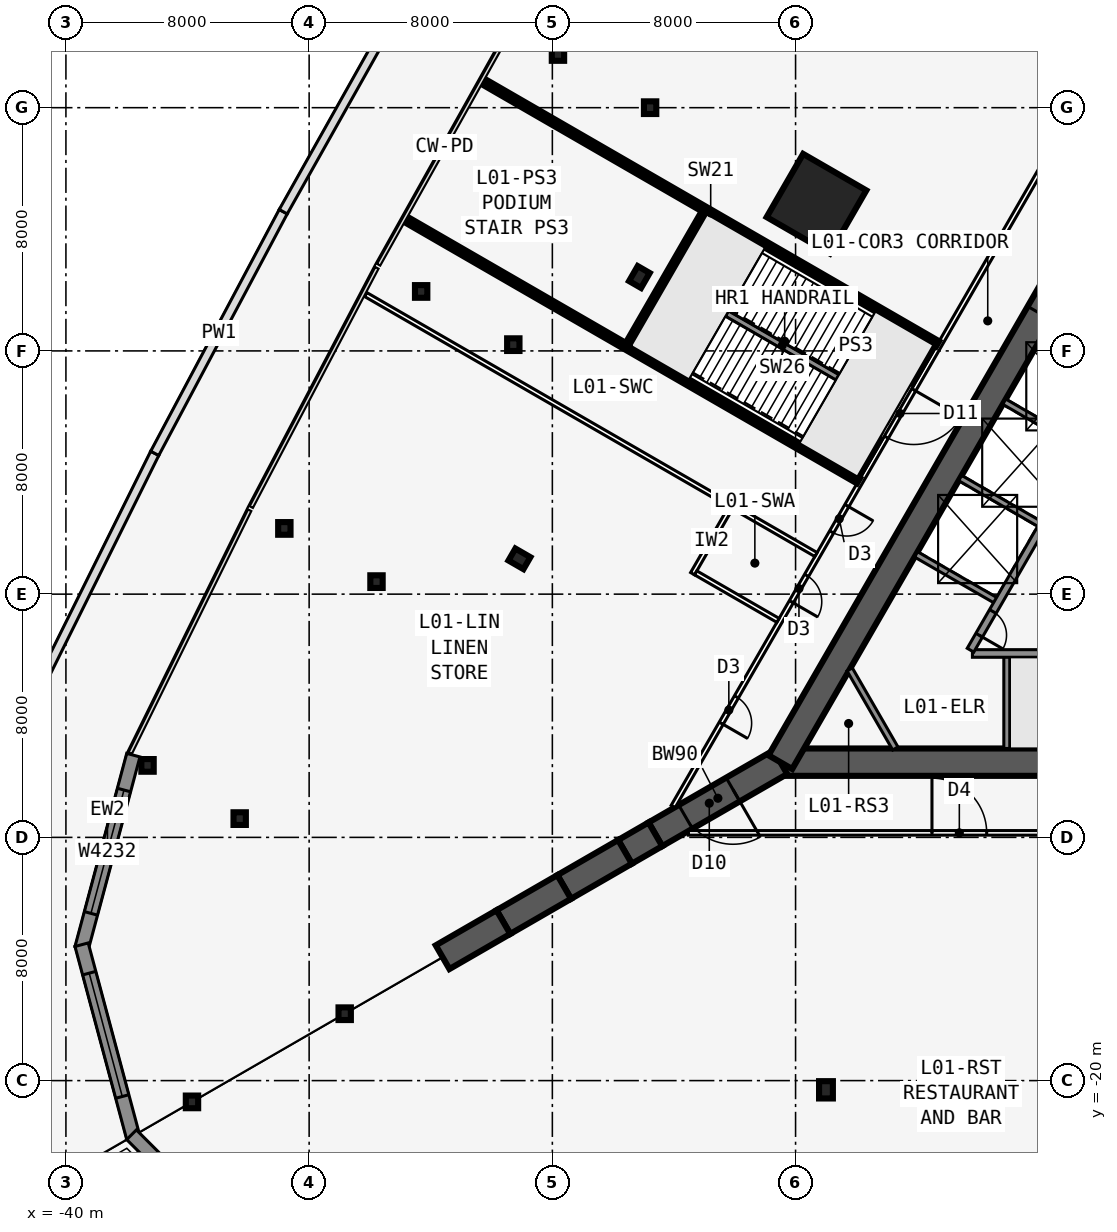
"""IFC4 building model, lengths in metres.
Left out: names, types, materials, properties, quantities, classifications, styles, units other than length and angle.
Written with IfcOpenShell. Run it as: python <this file> out.ifc"""

import sys

from ifc_helpers import new_model, si_unit, direction, frame, frame_2d, origin, origin_2d, place, context, subcontext, project, spatial, rectangle, i_section, extrude, element, fill, save


model = new_model("IFC4")
c1 = context("Model", 3, precision=1e-05, world=origin(), true_north=direction((0.0, 1.0)))
c2 = subcontext(c1, "Body", "Model", "MODEL_VIEW")
j1 = project(units=[si_unit("LENGTHUNIT", "METRE"), si_unit("PLANEANGLEUNIT", "RADIAN")], contexts=[c1])
p1 = place(None, origin())
s1 = spatial("IfcSite", under=j1, at=p1, CompositionType="ELEMENT")
p2 = place(p1, origin())
s2 = spatial("IfcBuilding", under=s1, at=p2, CompositionType="ELEMENT")
p3 = place(p2, frame((0.0, 0.0, 6.0)))
s3 = spatial("IfcBuildingStorey", under=s2, at=p3, CompositionType="ELEMENT", Elevation=6.0)
p4 = place(p3, frame((-16.5, -9.526, 0.0), z_axis=(0.0, 0.0, 1.0), x_axis=(1.0, 0.0, 0.0)))
e1 = element("IfcWall", 1, at=p4, inside=s3, PredefinedType="SHEAR", context=c2, shape_type="SweptSolid", body=[
    extrude(rectangle(XDim=33.0, YDim=0.9, at=frame_2d((16.5, 0.0))), origin(), (0.0, 0.0, 1.0), 5.0),
])
p5 = place(p4, frame((14.05, 0.0, 0.0)))
e2 = element("IfcOpeningElement", 2, at=p5, cuts=e1, PredefinedType="OPENING", context=c2, shape_type="SweptSolid", body=[
    extrude(rectangle(XDim=1.8, YDim=2.13, at=frame_2d((0.9, 1.065))), frame((0.0, 0.46, 0.0), z_axis=(0.0, -1.0, 0.0), x_axis=(1.0, 0.0, 0.0)), (0.0, 0.0, 1.0), 0.92),
])
p6 = place(p3, frame((-10.183, -5.951, 0.0), z_axis=(0.0, 0.0, 1.0), x_axis=(1.0, 0.0, 0.0)))
e3 = element("IfcWall", 3, at=p6, inside=s3, PredefinedType="SOLIDWALL", context=c2, shape_type="SweptSolid", body=[
    extrude(rectangle(XDim=7.633, YDim=0.25, at=frame_2d((3.816, 0.0))), origin(), (0.0, 0.0, 1.0), 4.75),
])
p7 = place(p3, frame((-9.05, -5.951, 0.0), z_axis=(0.0, 0.0, 1.0), x_axis=(0.0, -1.0, 0.0)))
e4 = element("IfcWall", 4, at=p7, inside=s3, PredefinedType="SOLIDWALL", context=c2, shape_type="SweptSolid", body=[
    extrude(rectangle(XDim=3.125, YDim=0.2, at=frame_2d((1.562, 0.0))), origin(), (0.0, 0.0, 1.0), 4.75),
])
p8 = place(p3, frame((0.0, 19.052, 0.0), z_axis=(0.0, 0.0, 1.0), x_axis=(-0.499999749417, -0.866025548458, 0.0)))
e5 = element("IfcWall", 5, at=p8, inside=s3, PredefinedType="SHEAR", context=c2, shape_type="SweptSolid", body=[
    extrude(rectangle(XDim=33.0, YDim=0.9, at=frame_2d((16.5, 0.0))), origin(), (0.0, 0.0, 1.0), 5.0),
])
p9 = place(p8, frame((14.15, 0.0, 0.0)))
e6 = element("IfcOpeningElement", 6, at=p9, cuts=e5, PredefinedType="OPENING", context=c2, shape_type="SweptSolid", body=[
    extrude(rectangle(XDim=1.8, YDim=2.13, at=frame_2d((0.9, 1.065))), frame((0.0, 0.46, 0.0), z_axis=(0.0, -1.0, 0.0), x_axis=(1.0, 0.0, 0.0)), (0.0, 0.0, 1.0), 0.92),
])
p10 = place(p8, frame((12.6, 0.0, 0.0)))
e7 = element("IfcOpeningElement", 7, at=p10, cuts=e5, PredefinedType="OPENING", context=c2, shape_type="SweptSolid", body=[
    extrude(rectangle(XDim=1.0, YDim=2.13, at=frame_2d((0.5, 1.065))), frame((0.0, 0.46, 0.0), z_axis=(0.0, -1.0, 0.0), x_axis=(1.0, 0.0, 0.0)), (0.0, 0.0, 1.0), 0.92),
])
p11 = place(p3, frame((-4.929, 3.365, 0.0), z_axis=(0.0, 0.0, 1.0), x_axis=(-0.499991433582, -0.866030349552, 0.0)))
e8 = element("IfcWall", 8, at=p11, inside=s3, PredefinedType="SOLIDWALL", context=c2, shape_type="SweptSolid", body=[
    extrude(rectangle(XDim=10.633, YDim=0.25, at=frame_2d((5.316, 0.0))), origin(), (0.0, 0.0, 1.0), 4.75),
])
p12 = place(p11, frame((9.164, 0.0, 0.0)))
e9 = element("IfcOpeningElement", 9, at=p12, cuts=e8, PredefinedType="OPENING", context=c2, shape_type="SweptSolid", body=[
    extrude(rectangle(XDim=0.9, YDim=2.13, at=frame_2d((0.45, 1.065))), frame((0.0, 0.135, 0.0), z_axis=(0.0, -1.0, 0.0), x_axis=(1.0, 0.0, 0.0)), (0.0, 0.0, 1.0), 0.27),
])
for number, where, z_axis, x_axis in (
    (10, (-6.429, 0.767, 0.0), (0.0, 0.0, 1.0), (-0.866, 0.5, 0.0)),
    (11, (-7.879, -1.744, 0.0), (0.0, 0.0, 1.0), (-0.866, 0.5, 0.0)),
    (12, (-9.329, -4.256, 0.0), (0.0, 0.0, 1.0), (-0.866, 0.5, 0.0)),
):
    element("IfcWall", number, at=place(p3, frame(where, z_axis=z_axis, x_axis=x_axis)), inside=s3, PredefinedType="SOLIDWALL", context=c2, shape_type="SweptSolid", body=[
        extrude(rectangle(XDim=3.125, YDim=0.2, at=frame_2d((1.562, 0.0))), origin(), (0.0, 0.0, 1.0), 4.75),
    ])
p13 = place(p3, frame((-16.5, -9.526, 0.0), z_axis=(0.0, 0.0, 1.0), x_axis=(-0.866031398331, -0.499989616998, 0.0)))
e13 = element("IfcWall", 13, at=p13, inside=s3, PredefinedType="SHEAR", context=c2, shape_type="SweptSolid", body=[
    extrude(rectangle(XDim=4.746, YDim=0.9, at=frame_2d((2.373, 0.0))), origin(), (0.0, 0.0, 1.0), 5.0),
])
p14 = place(p13, frame((1.8, 0.0, 0.0)))
e14 = element("IfcOpeningElement", 14, at=p14, cuts=e13, PredefinedType="OPENING", context=c2, shape_type="SweptSolid", body=[
    extrude(rectangle(XDim=1.8, YDim=2.13, at=frame_2d((0.9, 1.065))), frame((0.0, 0.46, 0.0), z_axis=(0.0, -1.0, 0.0), x_axis=(1.0, 0.0, 0.0)), (0.0, 0.0, 1.0), 0.92),
])
p15 = place(p3, frame((-20.61, -11.899, 0.0), z_axis=(0.0, 0.0, 1.0), x_axis=(-0.866009537788, -0.500027479704, 0.0)))
e15 = element("IfcWall", 15, at=p15, inside=s3, PredefinedType="SHEAR", context=c2, shape_type="SweptSolid", body=[
    extrude(rectangle(XDim=1.155, YDim=0.9, at=frame_2d((0.577, 0.0))), origin(), (0.0, 0.0, 1.0), 5.0),
])
for number, where, z_axis, x_axis in (
    (16, (-21.61, -12.477, 0.0), (0.0, 0.0, 1.0), (-0.866, -0.5, 0.0)),
    (17, (-23.61, -13.631, 0.0), (0.0, 0.0, 1.0), (-0.866, -0.5, 0.0)),
    (18, (-25.61, -14.786, 0.0), (0.0, 0.0, 1.0), (-0.866, -0.5, 0.0)),
):
    element("IfcWall", number, at=place(p3, frame(where, z_axis=z_axis, x_axis=x_axis)), inside=s3, PredefinedType="SHEAR", context=c2, shape_type="SweptSolid", body=[
        extrude(rectangle(XDim=2.309, YDim=0.9, at=frame_2d((1.155, 0.0))), origin(), (0.0, 0.0, 1.0), 5.0),
    ])
for number, where, z_axis, x_axis in (
    (19, (-15.0, -20.303, 0.0), (0.0, 0.0, 1.0), (1.0, 0.0, 0.0)),
    (20, (-21.137, 6.43, 0.0), (0.0, 0.0, 1.0), (-0.866, 0.5, 0.0)),
    (21, (-25.083, -2.839, 0.0), (0.0, 0.0, 1.0), (-0.5, -0.866, 0.0)),
):
    element("IfcColumn", number, at=place(p3, frame(where, z_axis=z_axis, x_axis=x_axis)), inside=s3, PredefinedType="COLUMN", context=c2, shape_type="SweptSolid", body=[
        extrude(i_section(OverallWidth=0.455, OverallDepth=0.569, WebThickness=0.078, FlangeThickness=0.125, at=origin_2d()), origin(), (0.0, 0.0, 1.0), 5.0),
    ])
for number, where, z_axis, x_axis in (
    (22, (-30.831, -17.8, 0.0), (0.0, 0.0, 1.0), (1.0, 0.0, 0.0)),
    (23, (-35.854, -20.7, 0.0), (0.0, 0.0, 1.0), (1.0, 0.0, 0.0)),
    (24, (-20.785, 12.0, 0.0), (0.0, 0.0, 1.0), (1.0, 0.0, 0.0)),
    (25, (-29.785, -3.588, 0.0), (0.0, 0.0, 1.0), (1.0, 0.0, 0.0)),
    (26, (-34.285, -11.383, 0.0), (0.0, 0.0, 1.0), (1.0, 0.0, 0.0)),
    (27, (-25.285, 4.206, 0.0), (0.0, 0.0, 1.0), (1.0, 0.0, 0.0)),
    (28, (-23.816, 13.75, 0.0), (0.0, 0.0, 1.0), (1.0, 0.0, 0.0)),
    (29, (-32.816, -1.838, 0.0), (0.0, 0.0, 1.0), (1.0, 0.0, 0.0)),
    (30, (-37.316, -9.633, 0.0), (0.0, 0.0, 1.0), (1.0, 0.0, 0.0)),
    (31, (-28.316, 5.956, 0.0), (0.0, 0.0, 1.0), (1.0, 0.0, 0.0)),
):
    element("IfcColumn", number, at=place(p3, frame(where, z_axis=z_axis, x_axis=x_axis)), inside=s3, PredefinedType="COLUMN", context=c2, shape_type="SweptSolid", body=[
        extrude(i_section(OverallWidth=0.406, OverallDepth=0.417, WebThickness=0.03, FlangeThickness=0.048, at=origin_2d()), origin(), (0.0, 0.0, 1.0), 5.0),
    ])
p16 = place(p3, frame((-15.312, 8.84, 0.0), z_axis=(0.0, 0.0, 1.0), x_axis=(-0.866025403784, 0.5, 0.0)))
e32 = element("IfcColumn", 32, at=p16, inside=s3, PredefinedType="COLUMN", context=c2, shape_type="SweptSolid", body=[
    extrude(rectangle(XDim=2.4, YDim=2.4, at=origin_2d()), origin(), (0.0, 0.0, 1.0), 5.0),
])
p17 = place(p3, frame((-37.783, -9.296, 0.0), z_axis=(0.0, 0.0, 1.0), x_axis=(-0.258813420722, -0.96592733332, 0.0)))
e33 = element("IfcWall", 33, at=p17, inside=s3, PredefinedType="SOLIDWALL", context=c2, shape_type="SweptSolid", body=[
    extrude(rectangle(XDim=6.575, YDim=0.45, at=frame_2d((3.288, 0.0))), origin(), (0.0, 0.0, 1.0), 4.75),
])
p18 = place(p17, frame((1.188, 0.0, 0.6)))
e34 = element("IfcOpeningElement", 34, at=p18, cuts=e33, PredefinedType="OPENING", context=c2, shape_type="SweptSolid", body=[
    extrude(rectangle(XDim=4.2, YDim=3.2, at=frame_2d((2.1, 1.6))), frame((0.0, 0.235, 0.0), z_axis=(0.0, -1.0, 0.0), x_axis=(1.0, 0.0, 0.0)), (0.0, 0.0, 1.0), 0.47),
])
p19 = place(p3, frame((-39.484, -15.53, 0.0), z_axis=(0.0, 0.0, 1.0), x_axis=(0.258813420722, -0.96592733332, 0.0)))
e35 = element("IfcWall", 35, at=p19, inside=s3, PredefinedType="SOLIDWALL", context=c2, shape_type="SweptSolid", body=[
    extrude(rectangle(XDim=6.575, YDim=0.45, at=frame_2d((3.288, 0.0))), origin(), (0.0, 0.0, 1.0), 4.75),
])
p20 = place(p19, frame((0.969, 0.0, 0.6)))
e36 = element("IfcOpeningElement", 36, at=p20, cuts=e35, PredefinedType="OPENING", context=c2, shape_type="SweptSolid", body=[
    extrude(rectangle(XDim=4.2, YDim=3.2, at=frame_2d((2.1, 1.6))), frame((0.0, 0.235, 0.0), z_axis=(0.0, -1.0, 0.0), x_axis=(1.0, 0.0, 0.0)), (0.0, 0.0, 1.0), 0.47),
])
p21 = place(p3, frame((-37.841, -21.78, 0.0), z_axis=(0.0, 0.0, 1.0), x_axis=(0.7070882144, -0.707125347486, 0.0)))
e37 = element("IfcWall", 37, at=p21, inside=s3, PredefinedType="SOLIDWALL", context=c2, shape_type="SweptSolid", body=[
    extrude(rectangle(XDim=6.575, YDim=0.45, at=frame_2d((3.287, 0.0))), origin(), (0.0, 0.0, 1.0), 4.75),
])
p22 = place(p21, frame((1.406, 0.0, 0.6)))
e38 = element("IfcOpeningElement", 38, at=p22, cuts=e37, PredefinedType="OPENING", context=c2, shape_type="SweptSolid", body=[
    extrude(rectangle(XDim=4.2, YDim=3.2, at=frame_2d((2.1, 1.6))), frame((0.0, 0.235, 0.0), z_axis=(0.0, -1.0, 0.0), x_axis=(1.0, 0.0, 0.0)), (0.0, 0.0, 1.0), 0.47),
])
p23 = place(p3, frame((-42.859, -11.023, 0.0), z_axis=(0.0, 0.0, 1.0), x_axis=(0.444351186514, 0.895852679319, 0.0)))
e39 = element("IfcWall", 39, at=p23, inside=s3, PredefinedType="PARAPET", context=c2, shape_type="SweptSolid", body=[
    extrude(rectangle(XDim=13.009, YDim=0.3, at=frame_2d((6.504, 0.0))), origin(), (0.0, 0.0, 1.0), 1.1),
])
p24 = place(p3, frame((-37.078, 0.631, 0.0), z_axis=(0.0, 0.0, 1.0), x_axis=(0.469540552861, 0.882910906728, 0.0)))
e40 = element("IfcWall", 40, at=p24, inside=s3, PredefinedType="PARAPET", context=c2, shape_type="SweptSolid", body=[
    extrude(rectangle(XDim=9.001, YDim=0.3, at=frame_2d((4.501, 0.0))), origin(), (0.0, 0.0, 1.0), 1.1),
])
p25 = place(p3, frame((-32.852, 8.579, 0.0), z_axis=(0.0, 0.0, 1.0), x_axis=(0.489901755097, 0.871777649606, 0.0)))
e41 = element("IfcWall", 41, at=p25, inside=s3, PredefinedType="PARAPET", context=c2, shape_type="SweptSolid", body=[
    extrude(rectangle(XDim=8.997, YDim=0.3, at=frame_2d((4.499, 0.0))), origin(), (0.0, 0.0, 1.0), 1.1),
])
p26 = place(p3, frame((-19.527, -11.851, 0.0), z_axis=(0.0, 0.0, 1.0), x_axis=(1.0, 0.0, 0.0)))
e42 = element("IfcWall", 42, at=p26, inside=s3, PredefinedType="PARTITIONING", context=c2, shape_type="SweptSolid", body=[
    extrude(rectangle(XDim=39.054, YDim=0.15, at=frame_2d((19.527, 0.0))), origin(), (0.0, 0.0, 1.0), 3.808),
])
p27 = place(p26, frame((8.013, 0.0, 0.0)))
e43 = element("IfcOpeningElement", 43, at=p27, cuts=e42, PredefinedType="OPENING", context=c2, shape_type="SweptSolid", body=[
    extrude(rectangle(XDim=1.8, YDim=2.13, at=frame_2d((0.9, 1.065))), frame((0.0, 0.085, 0.0), z_axis=(0.0, -1.0, 0.0), x_axis=(1.0, 0.0, 0.0)), (0.0, 0.0, 1.0), 0.17),
])
p28 = place(p26, frame((18.627, 0.0, 0.0)))
e44 = element("IfcOpeningElement", 44, at=p28, cuts=e42, PredefinedType="OPENING", context=c2, shape_type="SweptSolid", body=[
    extrude(rectangle(XDim=1.8, YDim=2.13, at=frame_2d((0.9, 1.065))), frame((0.0, 0.085, 0.0), z_axis=(0.0, -1.0, 0.0), x_axis=(1.0, 0.0, 0.0)), (0.0, 0.0, 1.0), 0.17),
])
p29 = place(p26, frame((23.227, 0.0, 0.0)))
e45 = element("IfcOpeningElement", 45, at=p29, cuts=e42, PredefinedType="OPENING", context=c2, shape_type="SweptSolid", body=[
    extrude(rectangle(XDim=1.8, YDim=2.13, at=frame_2d((0.9, 1.065))), frame((0.0, 0.085, 0.0), z_axis=(0.0, -1.0, 0.0), x_axis=(1.0, 0.0, 0.0)), (0.0, 0.0, 1.0), 0.17),
])
p30 = place(p26, frame((31.841, 0.0, 0.0)))
e46 = element("IfcOpeningElement", 46, at=p30, cuts=e42, PredefinedType="OPENING", context=c2, shape_type="SweptSolid", body=[
    extrude(rectangle(XDim=1.8, YDim=2.13, at=frame_2d((0.9, 1.065))), frame((0.0, 0.085, 0.0), z_axis=(0.0, -1.0, 0.0), x_axis=(1.0, 0.0, 0.0)), (0.0, 0.0, 1.0), 0.17),
])
p31 = place(p3, frame((-0.5, 22.836, 0.0), z_axis=(0.0, 0.0, 1.0), x_axis=(-0.500001677587, -0.866024435227, 0.0)))
e47 = element("IfcWall", 47, at=p31, inside=s3, PredefinedType="PARTITIONING", context=c2, shape_type="SweptSolid", body=[
    extrude(rectangle(XDim=39.054, YDim=0.15, at=frame_2d((19.527, 0.0))), origin(), (0.0, 0.0, 1.0), 3.808),
])
p32 = place(p31, frame((10.013, 0.0, 0.0)))
e48 = element("IfcOpeningElement", 48, at=p32, cuts=e47, PredefinedType="OPENING", context=c2, shape_type="SweptSolid", body=[
    extrude(rectangle(XDim=1.8, YDim=2.13, at=frame_2d((0.9, 1.065))), frame((0.0, 0.085, 0.0), z_axis=(0.0, -1.0, 0.0), x_axis=(1.0, 0.0, 0.0)), (0.0, 0.0, 1.0), 0.17),
])
p33 = place(p31, frame((23.227, 0.0, 0.0)))
e49 = element("IfcOpeningElement", 49, at=p33, cuts=e47, PredefinedType="OPENING", context=c2, shape_type="SweptSolid", body=[
    extrude(rectangle(XDim=1.8, YDim=2.13, at=frame_2d((0.9, 1.065))), frame((0.0, 0.085, 0.0), z_axis=(0.0, -1.0, 0.0), x_axis=(1.0, 0.0, 0.0)), (0.0, 0.0, 1.0), 0.17),
])
p34 = place(p31, frame((27.627, 0.0, 0.0)))
e50 = element("IfcOpeningElement", 50, at=p34, cuts=e47, PredefinedType="OPENING", context=c2, shape_type="SweptSolid", body=[
    extrude(rectangle(XDim=1.0, YDim=2.13, at=frame_2d((0.5, 1.065))), frame((0.0, 0.085, 0.0), z_axis=(0.0, -1.0, 0.0), x_axis=(1.0, 0.0, 0.0)), (0.0, 0.0, 1.0), 0.17),
])
p35 = place(p31, frame((30.277, 0.0, 0.0)))
e51 = element("IfcOpeningElement", 51, at=p35, cuts=e47, PredefinedType="OPENING", context=c2, shape_type="SweptSolid", body=[
    extrude(rectangle(XDim=1.0, YDim=2.13, at=frame_2d((0.5, 1.065))), frame((0.0, 0.085, 0.0), z_axis=(0.0, -1.0, 0.0), x_axis=(1.0, 0.0, 0.0)), (0.0, 0.0, 1.0), 0.17),
])
p36 = place(p31, frame((34.89, 0.0, 0.0)))
e52 = element("IfcOpeningElement", 52, at=p36, cuts=e47, PredefinedType="OPENING", context=c2, shape_type="SweptSolid", body=[
    extrude(rectangle(XDim=1.0, YDim=2.13, at=frame_2d((0.5, 1.065))), frame((0.0, 0.085, 0.0), z_axis=(0.0, -1.0, 0.0), x_axis=(1.0, 0.0, 0.0)), (0.0, 0.0, 1.0), 0.17),
])
p37 = place(p3, frame((-11.329, 4.231, 0.0), z_axis=(0.0, 0.0, 1.0), x_axis=(-0.86602660262, 0.49999792355, 0.0)))
e53 = element("IfcWall", 53, at=p37, inside=s3, PredefinedType="SHEAR", context=c2, shape_type="SweptSolid", body=[
    extrude(rectangle(XDim=17.236, YDim=0.2, at=frame_2d((8.618, 0.0))), origin(), (0.0, 0.0, 1.0), 5.0),
])
p38 = place(p3, frame((-13.928, -0.272, 0.0), z_axis=(0.0, 0.0, 1.0), x_axis=(-0.866023831254, 0.500002723692, 0.0)))
e54 = element("IfcWall", 54, at=p38, inside=s3, PredefinedType="SHEAR", context=c2, shape_type="SweptSolid", body=[
    extrude(rectangle(XDim=17.167, YDim=0.2, at=frame_2d((8.583, 0.0))), origin(), (0.0, 0.0, 1.0), 5.0),
])
p39 = place(p3, frame((-15.329, -2.697, 0.0), z_axis=(0.0, 0.0, 1.0), x_axis=(-0.866025820012, 0.499999279071, 0.0)))
e55 = element("IfcWall", 55, at=p39, inside=s3, PredefinedType="PARTITIONING", context=c2, shape_type="SweptSolid", body=[
    extrude(rectangle(XDim=17.101, YDim=0.15, at=frame_2d((8.55, 0.0))), origin(), (0.0, 0.0, 1.0), 3.808),
])
p40 = place(p3, frame((-18.137, -1.162, 0.0), z_axis=(0.0, 0.0, 1.0), x_axis=(-0.500004234368, -0.866022959057, 0.0)))
e56 = element("IfcWall", 56, at=p40, inside=s3, PredefinedType="PARTITIONING", context=c2, shape_type="SweptSolid", body=[
    extrude(rectangle(XDim=2.5, YDim=0.15, at=frame_2d((1.25, 0.0))), origin(), (0.0, 0.0, 1.0), 4.75),
])
p41 = place(p3, frame((-16.579, -4.862, 0.0), z_axis=(0.0, 0.0, 1.0), x_axis=(-0.866022959057, 0.500004234368, 0.0)))
e57 = element("IfcWall", 57, at=p41, inside=s3, PredefinedType="PARTITIONING", context=c2, shape_type="SweptSolid", body=[
    extrude(rectangle(XDim=3.125, YDim=0.15, at=frame_2d((1.562, 0.0))), origin(), (0.0, 0.0, 1.0), 4.75),
])
p42 = place(p3, frame((-12.719, -9.076, 0.0), z_axis=(0.0, 0.0, 1.0), x_axis=(-0.499952404951, 0.866052881055, 0.0)))
e58 = element("IfcWall", 58, at=p42, inside=s3, PredefinedType="SOLIDWALL", context=c2, shape_type="SweptSolid", body=[
    extrude(rectangle(XDim=3.002, YDim=0.2, at=frame_2d((1.501, 0.0))), origin(), (0.0, 0.0, 1.0), 4.75),
])
p43 = place(p3, frame((-18.949, 8.631, 0.0), z_axis=(0.0, 0.0, 1.0), x_axis=(-0.500006934395, -0.866021400173, 0.0)))
e59 = element("IfcWall", 59, at=p43, inside=s3, PredefinedType="SHEAR", context=c2, shape_type="SweptSolid", body=[
    extrude(rectangle(XDim=5.2, YDim=0.2, at=frame_2d((2.6, 0.0))), origin(), (0.0, 0.0, 1.0), 5.0),
])
for number, where, z_axis, x_axis in (
    (60, (-11.422, 4.169, 0.0), (0.0, 0.0, 1.0), (-0.5, -0.866, 0.0)),
    (61, (-13.172, 1.138, 0.0), (0.0, 0.0, 1.0), (-0.5, -0.866, 0.0)),
):
    element("IfcWall", number, at=place(p3, frame(where, z_axis=z_axis, x_axis=x_axis)), inside=s3, PredefinedType="SOLIDWALL", context=c2, shape_type="SweptSolid", body=[
        extrude(rectangle(XDim=1.5, YDim=0.1, at=frame_2d((0.75, 0.0))), origin(), (0.0, 0.0, 1.0), 5.0),
    ])
p44 = place(p3, frame((-14.623, 3.131, 0.0), z_axis=(0.0, 0.0, 1.0), x_axis=(-0.866031452229, 0.49998952364, 0.0)))
e62 = element("IfcWall", 62, at=p44, inside=s3, PredefinedType="SOLIDWALL", context=c2, shape_type="SweptSolid", body=[
    extrude(rectangle(XDim=4.194, YDim=0.2, at=frame_2d((2.097, 0.0))), origin(), (0.0, 0.0, 1.0), 5.0),
])
p45 = place(p18, origin())
e63 = element("IfcWindow", 63, at=p45, inside=s3, PartitioningType="SINGLE_PANEL", PredefinedType="WINDOW", context=c2, shape_type="SweptSolid", body=[
    extrude(rectangle(XDim=4.2, YDim=3.2, at=frame_2d((2.1, 1.6))), frame((0.0, 0.03, 0.0), z_axis=(0.0, -1.0, 0.0), x_axis=(1.0, 0.0, 0.0)), (0.0, 0.0, 1.0), 0.06),
])
fill(e34, e63)
p46 = place(p20, origin())
e64 = element("IfcWindow", 64, at=p46, inside=s3, PartitioningType="SINGLE_PANEL", PredefinedType="WINDOW", context=c2, shape_type="SweptSolid", body=[
    extrude(rectangle(XDim=4.2, YDim=3.2, at=frame_2d((2.1, 1.6))), frame((0.0, 0.03, 0.0), z_axis=(0.0, -1.0, 0.0), x_axis=(1.0, 0.0, 0.0)), (0.0, 0.0, 1.0), 0.06),
])
fill(e36, e64)
p47 = place(p27, origin())
e65 = element("IfcDoor", 65, at=p47, inside=s3, OperationType="DOUBLE_DOOR_SINGLE_SWING", PredefinedType="DOOR", context=c2, shape_type="SweptSolid", body=[
    extrude(rectangle(XDim=1.8, YDim=2.13, at=frame_2d((0.9, 1.065))), frame((0.0, 0.025, 0.0), z_axis=(0.0, -1.0, 0.0), x_axis=(1.0, 0.0, 0.0)), (0.0, 0.0, 1.0), 0.05),
])
fill(e43, e65)
p48 = place(p33, origin())
e66 = element("IfcDoor", 66, at=p48, inside=s3, OperationType="DOUBLE_DOOR_SINGLE_SWING", PredefinedType="DOOR", context=c2, shape_type="SweptSolid", body=[
    extrude(rectangle(XDim=1.8, YDim=2.13, at=frame_2d((0.9, 1.065))), frame((0.0, 0.025, 0.0), z_axis=(0.0, -1.0, 0.0), x_axis=(1.0, 0.0, 0.0)), (0.0, 0.0, 1.0), 0.05),
])
fill(e49, e66)
p49 = place(p34, origin())
e67 = element("IfcDoor", 67, at=p49, inside=s3, OperationType="SINGLE_SWING_LEFT", PredefinedType="DOOR", context=c2, shape_type="SweptSolid", body=[
    extrude(rectangle(XDim=1.0, YDim=2.13, at=frame_2d((0.5, 1.065))), frame((0.0, 0.025, 0.0), z_axis=(0.0, -1.0, 0.0), x_axis=(1.0, 0.0, 0.0)), (0.0, 0.0, 1.0), 0.05),
])
fill(e50, e67)
p50 = place(p35, origin())
e68 = element("IfcDoor", 68, at=p50, inside=s3, OperationType="SINGLE_SWING_RIGHT", PredefinedType="DOOR", context=c2, shape_type="SweptSolid", body=[
    extrude(rectangle(XDim=1.0, YDim=2.13, at=frame_2d((0.5, 1.065))), frame((0.0, 0.025, 0.0), z_axis=(0.0, -1.0, 0.0), x_axis=(1.0, 0.0, 0.0)), (0.0, 0.0, 1.0), 0.05),
])
fill(e51, e68)
p51 = place(p36, origin())
e69 = element("IfcDoor", 69, at=p51, inside=s3, OperationType="SINGLE_SWING_RIGHT", PredefinedType="DOOR", context=c2, shape_type="SweptSolid", body=[
    extrude(rectangle(XDim=1.0, YDim=2.13, at=frame_2d((0.5, 1.065))), frame((0.0, 0.025, 0.0), z_axis=(0.0, -1.0, 0.0), x_axis=(1.0, 0.0, 0.0)), (0.0, 0.0, 1.0), 0.05),
])
fill(e52, e69)
p52 = place(p14, origin())
e70 = element("IfcDoor", 70, at=p52, inside=s3, OperationType="DOUBLE_DOOR_DOUBLE_SWING", PredefinedType="DOOR", context=c2, shape_type="SweptSolid", body=[
    extrude(rectangle(XDim=1.8, YDim=2.13, at=frame_2d((0.9, 1.065))), frame((0.0, 0.025, 0.0), z_axis=(0.0, -1.0, 0.0), x_axis=(1.0, 0.0, 0.0)), (0.0, 0.0, 1.0), 0.05),
])
fill(e14, e70)
p53 = place(p12, origin())
e71 = element("IfcDoor", 71, at=p53, inside=s3, OperationType="SINGLE_SWING_RIGHT", PredefinedType="DOOR", context=c2, shape_type="SweptSolid", body=[
    extrude(rectangle(XDim=0.9, YDim=2.13, at=frame_2d((0.45, 1.065))), frame((0.0, 0.025, 0.0), z_axis=(0.0, -1.0, 0.0), x_axis=(1.0, 0.0, 0.0)), (0.0, 0.0, 1.0), 0.05),
])
fill(e9, e71)
save(model, sys.argv[1])
